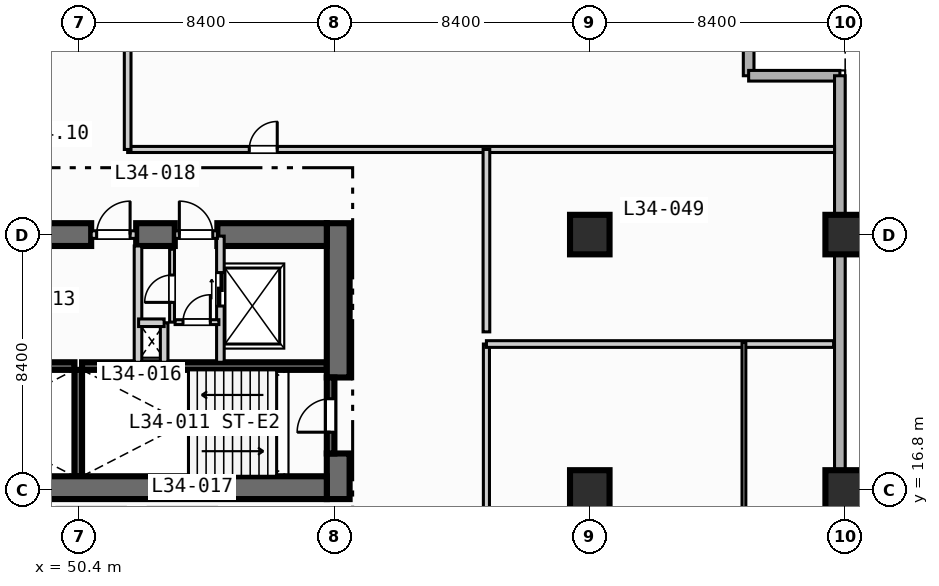
"""IFC4 building model, lengths in metres.
Left out: names, types, materials, properties, quantities, classifications, styles, units other than length and angle.
Written with IfcOpenShell. Run it as: python <this file> out.ifc"""

import sys

from ifc_helpers import new_model, si_unit, direction, frame, frame_2d, origin, origin_2d, place, context, subcontext, project, spatial, rectangle, extrude, element, fill, save


model = new_model("IFC4")
c1 = context("Model", 3, precision=1e-05, world=origin(), true_north=direction((0.0, 1.0)))
c2 = subcontext(c1, "Body", "Model", "MODEL_VIEW")
j1 = project(units=[si_unit("LENGTHUNIT", "METRE"), si_unit("PLANEANGLEUNIT", "RADIAN")], contexts=[c1])
p1 = place(None, origin())
s1 = spatial("IfcSite", under=j1, at=p1, CompositionType="ELEMENT")
p2 = place(p1, origin())
s2 = spatial("IfcBuilding", under=s1, at=p2, CompositionType="ELEMENT")
p3 = place(p2, frame((0.0, 0.0, 141.8)))
s3 = spatial("IfcBuildingStorey", under=s2, at=p3, CompositionType="ELEMENT", Elevation=141.8)
for number, where, z_axis, x_axis in (
    (1, (42.2, 20.875, 0.0), (0.0, 0.0, 1.0), (1.0, 0.0, 0.0)),
    (2, (50.5, 20.875, 0.0), (0.0, 0.0, 1.0), (1.0, 0.0, 0.0)),
):
    element("IfcWall", number, at=place(p3, frame(where, z_axis=z_axis, x_axis=x_axis)), inside=s3, PredefinedType="SOLIDWALL", context=c2, shape_type="SweptSolid", body=[
        extrude(rectangle(XDim=8.05, YDim=0.25, at=frame_2d((4.025, 0.0))), origin(), (0.0, 0.0, 1.0), 3.55),
    ])
p4 = place(p3, frame((50.375, 17.25, 0.0), z_axis=(0.0, 0.0, 1.0), x_axis=(0.0, 1.0, 0.0)))
e3 = element("IfcWall", 3, at=p4, inside=s3, PredefinedType="SOLIDWALL", context=c2, shape_type="SweptSolid", body=[
    extrude(rectangle(XDim=3.5, YDim=0.25, at=frame_2d((1.75, 0.0))), origin(), (0.0, 0.0, 1.0), 3.55),
])
p5 = place(p3, frame((58.925, 16.5, 0.0), z_axis=(0.0, 0.0, 1.0), x_axis=(0.0, 1.0, 0.0)))
e4 = element("IfcWall", 4, at=p5, inside=s3, PredefinedType="SHEAR", context=c2, shape_type="SweptSolid", body=[
    extrude(rectangle(XDim=1.5, YDim=0.75, at=frame_2d((0.75, 0.0))), origin(), (0.0, 0.0, 1.0), 3.55),
])
p6 = place(p3, frame((58.925, 20.5, 0.0), z_axis=(0.0, 0.0, 1.0), x_axis=(0.0, 1.0, 0.0)))
e5 = element("IfcWall", 5, at=p6, inside=s3, PredefinedType="SHEAR", context=c2, shape_type="SweptSolid", body=[
    extrude(rectangle(XDim=5.075, YDim=0.75, at=frame_2d((2.538, 0.0))), origin(), (0.0, 0.0, 1.0), 3.55),
])
p7 = place(p3, frame((42.2, 16.875, 0.0), z_axis=(0.0, 0.0, 1.0), x_axis=(1.0, 0.0, 0.0)))
e6 = element("IfcWall", 6, at=p7, inside=s3, PredefinedType="SHEAR", context=c2, shape_type="SweptSolid", body=[
    extrude(rectangle(XDim=16.35, YDim=0.75, at=frame_2d((8.175, 0.0))), origin(), (0.0, 0.0, 1.0), 3.55),
])
p8 = place(p3, frame((42.2, 25.2, 0.0), z_axis=(0.0, 0.0, 1.0), x_axis=(1.0, 0.0, 0.0)))
e7 = element("IfcWall", 7, at=p8, inside=s3, PredefinedType="SHEAR", context=c2, shape_type="SweptSolid", body=[
    extrude(rectangle(XDim=8.6, YDim=0.75, at=frame_2d((4.3, 0.0))), origin(), (0.0, 0.0, 1.0), 3.55),
])
p9 = place(p3, frame((52.28, 25.2, 0.0), z_axis=(0.0, 0.0, 1.0), x_axis=(1.0, 0.0, 0.0)))
e8 = element("IfcWall", 8, at=p9, inside=s3, PredefinedType="SHEAR", context=c2, shape_type="SweptSolid", body=[
    extrude(rectangle(XDim=1.27, YDim=0.75, at=frame_2d((0.635, 0.0))), origin(), (0.0, 0.0, 1.0), 3.55),
])
p10 = place(p3, frame((54.95, 25.2, 0.0), z_axis=(0.0, 0.0, 1.0), x_axis=(1.0, 0.0, 0.0)))
e9 = element("IfcWall", 9, at=p10, inside=s3, PredefinedType="SHEAR", context=c2, shape_type="SweptSolid", body=[
    extrude(rectangle(XDim=3.6, YDim=0.75, at=frame_2d((1.8, 0.0))), origin(), (0.0, 0.0, 1.0), 3.55),
])
for number, where, z_axis, x_axis in (
    (10, (67.2, 16.8, 0.0), (0.0, 0.0, 1.0), (1.0, 0.0, 0.0)),
    (11, (67.2, 25.2, 0.0), (0.0, 0.0, 1.0), (1.0, 0.0, 0.0)),
    (12, (75.6, 16.8, 0.0), (0.0, 0.0, 1.0), (1.0, 0.0, 0.0)),
    (13, (75.6, 25.2, 0.0), (0.0, 0.0, 1.0), (1.0, 0.0, 0.0)),
):
    element("IfcColumn", number, at=place(p3, frame(where, z_axis=z_axis, x_axis=x_axis)), inside=s3, PredefinedType="COLUMN", context=c2, shape_type="SweptSolid", body=[
        extrude(rectangle(XDim=1.3, YDim=1.3, at=origin_2d()), origin(), (0.0, 0.0, 1.0), 3.8),
    ])
for number, where, z_axis, x_axis in (
    (14, (72.425, 33.425, 0.0), (0.0, 0.0, 1.0), (0.0, -1.0, 0.0)),
    (15, (72.425, 30.425, 0.0), (0.0, 0.0, 1.0), (1.0, 0.0, 0.0)),
):
    element("IfcWall", number, at=place(p3, frame(where, z_axis=z_axis, x_axis=x_axis)), inside=s3, PredefinedType="STANDARD", context=c2, shape_type="SweptSolid", body=[
        extrude(rectangle(XDim=3.0, YDim=0.35, at=frame_2d((1.5, 0.0))), origin(), (0.0, 0.0, 1.0), 3.55),
    ])
p11 = place(p3, frame((75.425, 30.425, 0.0), z_axis=(0.0, 0.0, 1.0), x_axis=(0.0, -1.0, 0.0)))
e16 = element("IfcWall", 16, at=p11, inside=s3, PredefinedType="STANDARD", context=c2, shape_type="SweptSolid", body=[
    extrude(rectangle(XDim=27.25, YDim=0.35, at=frame_2d((13.625, 0.0))), origin(), (0.0, 0.0, 1.0), 3.55),
])
p12 = place(p11, frame((16.725, 0.0, 0.85)))
e17 = element("IfcOpeningElement", 17, at=p12, cuts=e16, PredefinedType="OPENING", context=c2, shape_type="SweptSolid", body=[
    extrude(rectangle(XDim=2.2, YDim=1.8, at=frame_2d((1.1, 0.9))), frame((0.0, 0.185, 0.0), z_axis=(0.0, -1.0, 0.0), x_axis=(1.0, 0.0, 0.0)), (0.0, 0.0, 1.0), 0.37),
])
p13 = place(p3, frame((58.675, 18.0, 0.0), z_axis=(0.0, 0.0, 1.0), x_axis=(0.0, 1.0, 0.0)))
e18 = element("IfcWall", 18, at=p13, inside=s3, PredefinedType="SOLIDWALL", context=c2, shape_type="SweptSolid", body=[
    extrude(rectangle(XDim=2.5, YDim=0.25, at=frame_2d((1.25, 0.0))), origin(), (0.0, 0.0, 1.0), 3.55),
])
p14 = place(p13, frame((0.7, 0.0, 0.0)))
e19 = element("IfcOpeningElement", 19, at=p14, cuts=e18, PredefinedType="OPENING", context=c2, shape_type="SweptSolid", body=[
    extrude(rectangle(XDim=1.1, YDim=2.15, at=frame_2d((0.55, 1.075))), frame((0.0, 0.135, 0.0), z_axis=(0.0, -1.0, 0.0), x_axis=(1.0, 0.0, 0.0)), (0.0, 0.0, 1.0), 0.27),
])
p15 = place(p3, frame((50.8, 25.2, 0.0), z_axis=(0.0, 0.0, 1.0), x_axis=(1.0, 0.0, 0.0)))
e20 = element("IfcWall", 20, at=p15, inside=s3, PredefinedType="SOLIDWALL", context=c2, shape_type="SweptSolid", body=[
    extrude(rectangle(XDim=1.48, YDim=0.25, at=frame_2d((0.74, 0.0))), origin(), (0.0, 0.0, 1.0), 3.55),
])
p16 = place(p15, frame((0.18, 0.0, 0.0)))
e21 = element("IfcOpeningElement", 21, at=p16, cuts=e20, PredefinedType="OPENING", context=c2, shape_type="SweptSolid", body=[
    extrude(rectangle(XDim=1.1, YDim=2.15, at=frame_2d((0.55, 1.075))), frame((0.0, 0.135, 0.0), z_axis=(0.0, -1.0, 0.0), x_axis=(1.0, 0.0, 0.0)), (0.0, 0.0, 1.0), 0.27),
])
p17 = place(p3, frame((52.34, 21.0, 0.0), z_axis=(0.0, 0.0, 1.0), x_axis=(0.0, 1.0, 0.0)))
e22 = element("IfcWall", 22, at=p17, inside=s3, PredefinedType="SOLIDWALL", context=c2, shape_type="SweptSolid", body=[
    extrude(rectangle(XDim=3.825, YDim=0.25, at=frame_2d((1.913, 0.0))), origin(), (0.0, 0.0, 1.0), 3.55),
])
p18 = place(p3, frame((55.05, 21.0, 0.0), z_axis=(0.0, 0.0, 1.0), x_axis=(0.0, 1.0, 0.0)))
e23 = element("IfcWall", 23, at=p18, inside=s3, PredefinedType="SOLIDWALL", context=c2, shape_type="SweptSolid", body=[
    extrude(rectangle(XDim=4.15, YDim=0.25, at=frame_2d((2.075, 0.0))), origin(), (0.0, 0.0, 1.0), 3.55),
])
p19 = place(p18, frame((1.85, 0.0, 0.0)))
e24 = element("IfcOpeningElement", 24, at=p19, cuts=e23, PredefinedType="OPENING", context=c2, shape_type="SweptSolid", body=[
    extrude(rectangle(XDim=1.1, YDim=2.15, at=frame_2d((0.55, 1.075))), frame((0.0, 0.135, 0.0), z_axis=(0.0, -1.0, 0.0), x_axis=(1.0, 0.0, 0.0)), (0.0, 0.0, 1.0), 0.27),
])
p20 = place(p3, frame((53.55, 25.2, 0.0), z_axis=(0.0, 0.0, 1.0), x_axis=(1.0, 0.0, 0.0)))
e25 = element("IfcWall", 25, at=p20, inside=s3, PredefinedType="SOLIDWALL", context=c2, shape_type="SweptSolid", body=[
    extrude(rectangle(XDim=1.4, YDim=0.25, at=frame_2d((0.7, 0.0))), origin(), (0.0, 0.0, 1.0), 3.55),
])
p21 = place(p20, frame((0.15, 0.0, 0.0)))
e26 = element("IfcOpeningElement", 26, at=p21, cuts=e25, PredefinedType="OPENING", context=c2, shape_type="SweptSolid", body=[
    extrude(rectangle(XDim=1.1, YDim=2.15, at=frame_2d((0.55, 1.075))), frame((0.0, 0.135, 0.0), z_axis=(0.0, -1.0, 0.0), x_axis=(1.0, 0.0, 0.0)), (0.0, 0.0, 1.0), 0.27),
])
p22 = place(p3, frame((53.2, 21.0, 0.0), z_axis=(0.0, 0.0, 1.0), x_axis=(0.0, 1.0, 0.0)))
e27 = element("IfcWall", 27, at=p22, inside=s3, PredefinedType="SOLIDWALL", context=c2, shape_type="SweptSolid", body=[
    extrude(rectangle(XDim=1.3, YDim=0.25, at=frame_2d((0.65, 0.0))), origin(), (0.0, 0.0, 1.0), 3.55),
])
p23 = place(p3, frame((52.36, 22.3, 0.0), z_axis=(0.0, 0.0, 1.0), x_axis=(1.0, 0.0, 0.0)))
e28 = element("IfcWall", 28, at=p23, inside=s3, PredefinedType="SOLIDWALL", context=c2, shape_type="SweptSolid", body=[
    extrude(rectangle(XDim=0.84, YDim=0.25, at=frame_2d((0.42, 0.0))), origin(), (0.0, 0.0, 1.0), 3.55),
])
p24 = place(p3, frame((53.56, 22.32, 0.0), z_axis=(0.0, 0.0, 1.0), x_axis=(1.0, 0.0, 0.0)))
e29 = element("IfcWall", 29, at=p24, inside=s3, PredefinedType="PARTITIONING", context=c2, shape_type="SweptSolid", body=[
    extrude(rectangle(XDim=1.44, YDim=0.16, at=frame_2d((0.72, 0.0))), origin(), (0.0, 0.0, 1.0), 3.55),
])
p25 = place(p24, frame((0.26, 0.0, 0.0)))
e30 = element("IfcOpeningElement", 30, at=p25, cuts=e29, PredefinedType="OPENING", context=c2, shape_type="SweptSolid", body=[
    extrude(rectangle(XDim=0.9, YDim=2.1, at=frame_2d((0.45, 1.05))), frame((0.0, 0.09, 0.0), z_axis=(0.0, -1.0, 0.0), x_axis=(1.0, 0.0, 0.0)), (0.0, 0.0, 1.0), 0.18),
])
p26 = place(p3, frame((53.46, 22.32, 0.0), z_axis=(0.0, 0.0, 1.0), x_axis=(0.0, 1.0, 0.0)))
e31 = element("IfcWall", 31, at=p26, inside=s3, PredefinedType="PARTITIONING", context=c2, shape_type="SweptSolid", body=[
    extrude(rectangle(XDim=2.4, YDim=0.16, at=frame_2d((1.2, 0.0))), origin(), (0.0, 0.0, 1.0), 3.55),
])
p27 = place(p26, frame((0.65, 0.0, 0.0)))
e32 = element("IfcOpeningElement", 32, at=p27, cuts=e31, PredefinedType="OPENING", context=c2, shape_type="SweptSolid", body=[
    extrude(rectangle(XDim=0.9, YDim=2.1, at=frame_2d((0.45, 1.05))), frame((0.0, 0.09, 0.0), z_axis=(0.0, -1.0, 0.0), x_axis=(1.0, 0.0, 0.0)), (0.0, 0.0, 1.0), 0.18),
])
p28 = place(p3, frame((63.8, 3.4, 0.0), z_axis=(0.0, 0.0, 1.0), x_axis=(0.0, 1.0, 0.0)))
e33 = element("IfcWall", 33, at=p28, inside=s3, PredefinedType="PARTITIONING", context=c2, shape_type="SweptSolid", body=[
    extrude(rectangle(XDim=18.2, YDim=0.2, at=frame_2d((9.1, 0.0))), origin(), (0.0, 0.0, 1.0), 3.55),
])
p29 = place(p28, frame((3.7, 0.0, 0.0)))
e34 = element("IfcOpeningElement", 34, at=p29, cuts=e33, PredefinedType="OPENING", context=c2, shape_type="SweptSolid", body=[
    extrude(rectangle(XDim=1.0, YDim=2.15, at=frame_2d((0.5, 1.075))), frame((0.0, 0.11, 0.0), z_axis=(0.0, -1.0, 0.0), x_axis=(1.0, 0.0, 0.0)), (0.0, 0.0, 1.0), 0.22),
])
p30 = place(p3, frame((63.8, 21.6, 0.0), z_axis=(0.0, 0.0, 1.0), x_axis=(1.0, 0.0, 0.0)))
e35 = element("IfcWall", 35, at=p30, inside=s3, PredefinedType="PARTITIONING", context=c2, shape_type="SweptSolid", body=[
    extrude(rectangle(XDim=11.42, YDim=0.22, at=frame_2d((5.71, 0.0))), origin(), (0.0, 0.0, 1.0), 3.55),
])
p31 = place(p3, frame((72.27, 3.25, 0.0), z_axis=(0.0, 0.0, 1.0), x_axis=(0.0, 1.0, 0.0)))
e36 = element("IfcWall", 36, at=p31, inside=s3, PredefinedType="PARTITIONING", context=c2, shape_type="SweptSolid", body=[
    extrude(rectangle(XDim=18.4, YDim=0.125, at=frame_2d((9.2, 0.0))), origin(), (0.0, 0.0, 1.0), 3.55),
])
p32 = place(p31, frame((8.19, 0.0, 0.0)))
e37 = element("IfcOpeningElement", 37, at=p32, cuts=e36, PredefinedType="OPENING", context=c2, shape_type="SweptSolid", body=[
    extrude(rectangle(XDim=0.92, YDim=2.1, at=frame_2d((0.46, 1.05))), frame((0.0, 0.073, 0.0), z_axis=(0.0, -1.0, 0.0), x_axis=(1.0, 0.0, 0.0)), (0.0, 0.0, 1.0), 0.145),
])
p33 = place(p3, frame((52.0, 28.0, 0.0), z_axis=(0.0, 0.0, 1.0), x_axis=(1.0, 0.0, 0.0)))
e38 = element("IfcWall", 38, at=p33, inside=s3, PredefinedType="PARTITIONING", context=c2, shape_type="SweptSolid", body=[
    extrude(rectangle(XDim=23.25, YDim=0.2, at=frame_2d((11.625, 0.0))), origin(), (0.0, 0.0, 1.0), 3.55),
])
p34 = place(p33, frame((4.0, 0.0, 0.0)))
e39 = element("IfcOpeningElement", 39, at=p34, cuts=e38, PredefinedType="OPENING", context=c2, shape_type="SweptSolid", body=[
    extrude(rectangle(XDim=0.92, YDim=2.1, at=frame_2d((0.46, 1.05))), frame((0.0, 0.11, 0.0), z_axis=(0.0, -1.0, 0.0), x_axis=(1.0, 0.0, 0.0)), (0.0, 0.0, 1.0), 0.22),
])
p35 = place(p3, frame((52.0, 28.0, 0.0), z_axis=(0.0, 0.0, 1.0), x_axis=(0.0, 1.0, 0.0)))
e40 = element("IfcWall", 40, at=p35, inside=s3, PredefinedType="PARTITIONING", context=c2, shape_type="SweptSolid", body=[
    extrude(rectangle(XDim=5.3, YDim=0.22, at=frame_2d((2.65, 0.0))), origin(), (0.0, 0.0, 1.0), 3.55),
])
p36 = place(p3, frame((63.8, 22.0, 0.0), z_axis=(0.0, 0.0, 1.0), x_axis=(0.0, 1.0, 0.0)))
e41 = element("IfcWall", 41, at=p36, inside=s3, PredefinedType="PARTITIONING", context=c2, shape_type="SweptSolid", body=[
    extrude(rectangle(XDim=6.0, YDim=0.22, at=frame_2d((3.0, 0.0))), origin(), (0.0, 0.0, 1.0), 3.55),
])
p37 = place(p14, origin())
e42 = element("IfcDoor", 42, at=p37, inside=s3, OperationType="SINGLE_SWING_LEFT", PredefinedType="DOOR", context=c2, shape_type="SweptSolid", body=[
    extrude(rectangle(XDim=1.1, YDim=2.15, at=frame_2d((0.55, 1.075))), frame((0.0, 0.025, 0.0), z_axis=(0.0, -1.0, 0.0), x_axis=(1.0, 0.0, 0.0)), (0.0, 0.0, 1.0), 0.05),
])
fill(e19, e42)
p38 = place(p16, origin())
e43 = element("IfcDoor", 43, at=p38, inside=s3, OperationType="SINGLE_SWING_RIGHT", PredefinedType="DOOR", context=c2, shape_type="SweptSolid", body=[
    extrude(rectangle(XDim=1.1, YDim=2.15, at=frame_2d((0.55, 1.075))), frame((0.0, 0.025, 0.0), z_axis=(0.0, -1.0, 0.0), x_axis=(1.0, 0.0, 0.0)), (0.0, 0.0, 1.0), 0.05),
])
fill(e21, e43)
p39 = place(p19, origin())
e44 = element("IfcDoor", 44, at=p39, inside=s3, OperationType="SLIDING_TO_LEFT", PredefinedType="DOOR", context=c2, shape_type="SweptSolid", body=[
    extrude(rectangle(XDim=1.1, YDim=2.15, at=frame_2d((0.55, 1.075))), frame((0.0, 0.025, 0.0), z_axis=(0.0, -1.0, 0.0), x_axis=(1.0, 0.0, 0.0)), (0.0, 0.0, 1.0), 0.05),
])
fill(e24, e44)
p40 = place(p21, origin())
e45 = element("IfcDoor", 45, at=p40, inside=s3, OperationType="SINGLE_SWING_LEFT", PredefinedType="DOOR", context=c2, shape_type="SweptSolid", body=[
    extrude(rectangle(XDim=1.1, YDim=2.15, at=frame_2d((0.55, 1.075))), frame((0.0, 0.025, 0.0), z_axis=(0.0, -1.0, 0.0), x_axis=(1.0, 0.0, 0.0)), (0.0, 0.0, 1.0), 0.05),
])
fill(e26, e45)
p41 = place(p25, origin())
e46 = element("IfcDoor", 46, at=p41, inside=s3, OperationType="SINGLE_SWING_RIGHT", PredefinedType="DOOR", context=c2, shape_type="SweptSolid", body=[
    extrude(rectangle(XDim=0.9, YDim=2.1, at=frame_2d((0.45, 1.05))), frame((0.0, 0.025, 0.0), z_axis=(0.0, -1.0, 0.0), x_axis=(1.0, 0.0, 0.0)), (0.0, 0.0, 1.0), 0.05),
])
fill(e30, e46)
p42 = place(p27, origin())
e47 = element("IfcDoor", 47, at=p42, inside=s3, OperationType="SINGLE_SWING_LEFT", PredefinedType="DOOR", context=c2, shape_type="SweptSolid", body=[
    extrude(rectangle(XDim=0.9, YDim=2.1, at=frame_2d((0.45, 1.05))), frame((0.0, 0.025, 0.0), z_axis=(0.0, -1.0, 0.0), x_axis=(1.0, 0.0, 0.0)), (0.0, 0.0, 1.0), 0.05),
])
fill(e32, e47)
p43 = place(p34, origin())
e48 = element("IfcDoor", 48, at=p43, inside=s3, OperationType="SINGLE_SWING_RIGHT", PredefinedType="DOOR", context=c2, shape_type="SweptSolid", body=[
    extrude(rectangle(XDim=0.92, YDim=2.1, at=frame_2d((0.46, 1.05))), frame((0.0, 0.025, 0.0), z_axis=(0.0, -1.0, 0.0), x_axis=(1.0, 0.0, 0.0)), (0.0, 0.0, 1.0), 0.05),
])
fill(e39, e48)
save(model, sys.argv[1])
